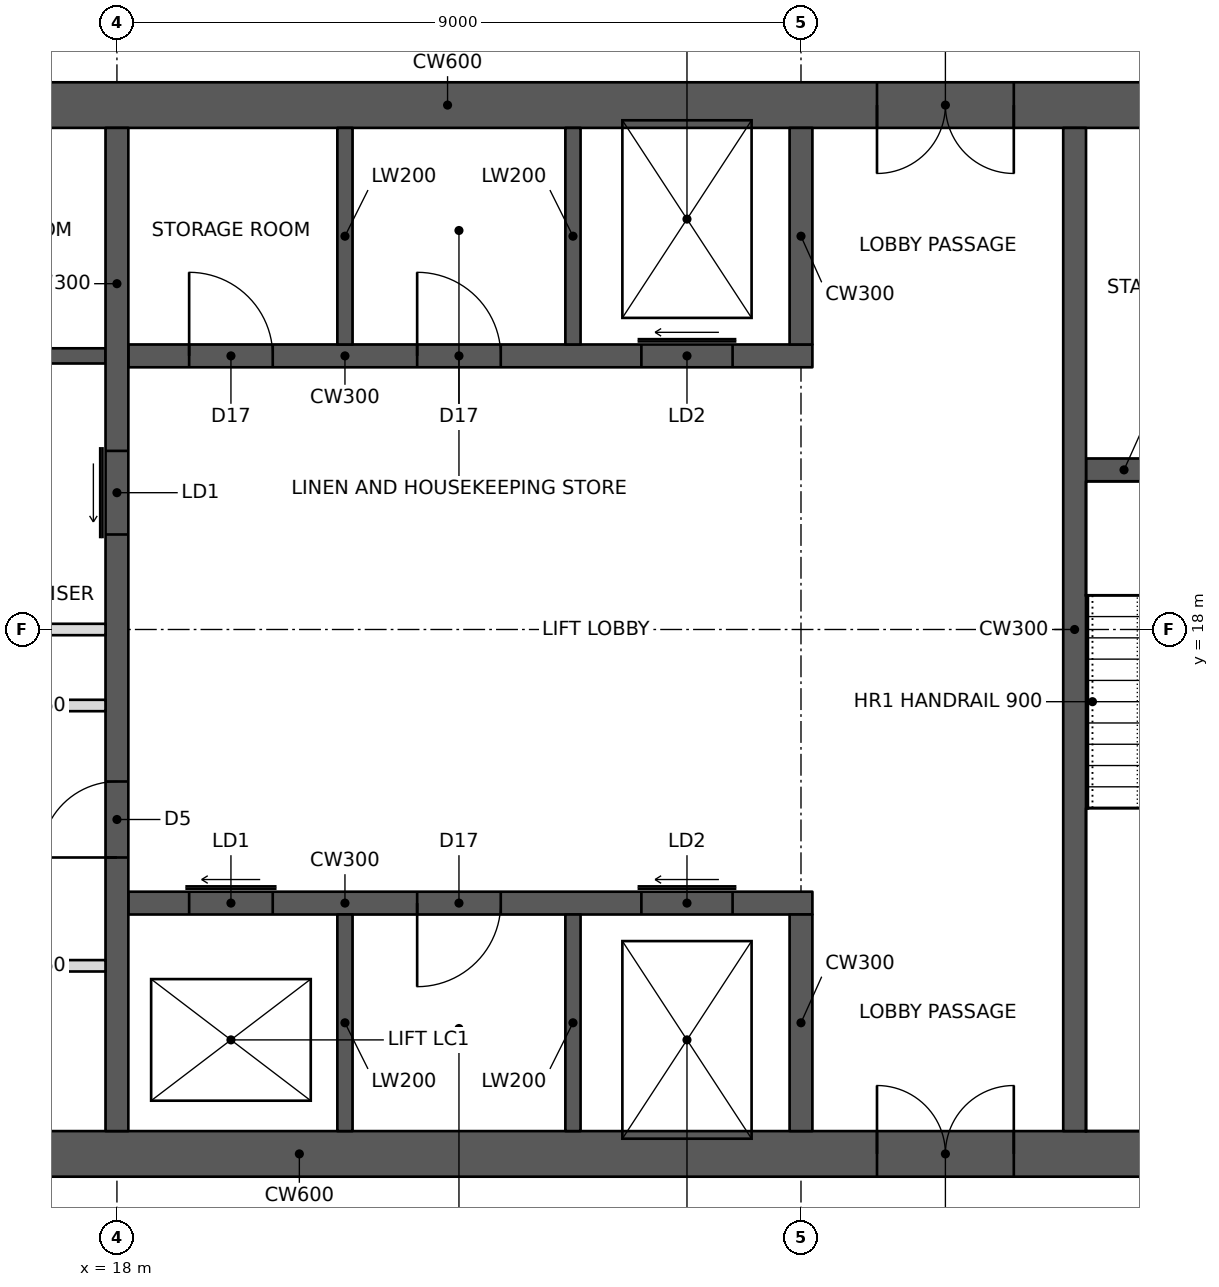
"""IFC4 building model, lengths in metres.
Left out: names, types, materials, properties, quantities, classifications, styles, units other than length and angle.
Written with IfcOpenShell. Run it as: python <this file> out.ifc"""

import sys

from ifc_helpers import new_model, si_unit, direction, frame, frame_2d, origin, place, context, subcontext, project, spatial, rectangle, extrude, element, fill, save


model = new_model("IFC4")
c1 = context("Model", 3, precision=1e-05, world=origin(), true_north=direction((0.0, 1.0)))
c2 = subcontext(c1, "Body", "Model", "MODEL_VIEW")
j1 = project(units=[si_unit("LENGTHUNIT", "METRE"), si_unit("PLANEANGLEUNIT", "RADIAN")], contexts=[c1])
p1 = place(None, origin())
s1 = spatial("IfcSite", under=j1, at=p1, CompositionType="ELEMENT")
p2 = place(p1, origin())
s2 = spatial("IfcBuilding", under=s1, at=p2, CompositionType="ELEMENT")
p3 = place(p2, frame((0.0, 0.0, 266.2)))
s3 = spatial("IfcBuildingStorey", under=s2, at=p3, CompositionType="ELEMENT", Elevation=266.2)
p4 = place(p3, frame((10.8, 11.1, 0.0), z_axis=(0.0, 0.0, 1.0), x_axis=(1.0, 0.0, 0.0)))
e1 = element("IfcWall", 1, at=p4, inside=s3, PredefinedType="SHEAR", context=c2, shape_type="SweptSolid", body=[
    extrude(rectangle(XDim=23.4, YDim=0.6, at=frame_2d((11.7, 0.0))), origin(), (0.0, 0.0, 1.0), 3.6),
])
p5 = place(p4, frame((1.0, 0.0, 0.0)))
e2 = element("IfcOpeningElement", 2, at=p5, cuts=e1, PredefinedType="OPENING", context=c2, shape_type="SweptSolid", body=[
    extrude(rectangle(XDim=1.0, YDim=2.1, at=frame_2d((0.5, 1.05))), frame((0.0, 0.31, 0.0), z_axis=(0.0, -1.0, 0.0), x_axis=(1.0, 0.0, 0.0)), (0.0, 0.0, 1.0), 0.62),
])
p6 = place(p4, frame((17.2, 0.0, 0.0)))
e3 = element("IfcOpeningElement", 3, at=p6, cuts=e1, PredefinedType="OPENING", context=c2, shape_type="SweptSolid", body=[
    extrude(rectangle(XDim=1.8, YDim=2.1, at=frame_2d((0.9, 1.05))), frame((0.0, 0.31, 0.0), z_axis=(0.0, -1.0, 0.0), x_axis=(1.0, 0.0, 0.0)), (0.0, 0.0, 1.0), 0.62),
])
p7 = place(p3, frame((10.8, 24.9, 0.0), z_axis=(0.0, 0.0, 1.0), x_axis=(1.0, 0.0, 0.0)))
e4 = element("IfcWall", 4, at=p7, inside=s3, PredefinedType="SHEAR", context=c2, shape_type="SweptSolid", body=[
    extrude(rectangle(XDim=23.4, YDim=0.6, at=frame_2d((11.7, 0.0))), origin(), (0.0, 0.0, 1.0), 3.6),
])
p8 = place(p7, frame((17.2, 0.0, 0.0)))
e5 = element("IfcOpeningElement", 5, at=p8, cuts=e4, PredefinedType="OPENING", context=c2, shape_type="SweptSolid", body=[
    extrude(rectangle(XDim=1.8, YDim=2.1, at=frame_2d((0.9, 1.05))), frame((0.0, 0.31, 0.0), z_axis=(0.0, -1.0, 0.0), x_axis=(1.0, 0.0, 0.0)), (0.0, 0.0, 1.0), 0.62),
])
p9 = place(p7, frame((21.1, 0.0, 0.0)))
e6 = element("IfcOpeningElement", 6, at=p9, cuts=e4, PredefinedType="OPENING", context=c2, shape_type="SweptSolid", body=[
    extrude(rectangle(XDim=1.0, YDim=2.1, at=frame_2d((0.5, 1.05))), frame((0.0, 0.31, 0.0), z_axis=(0.0, -1.0, 0.0), x_axis=(1.0, 0.0, 0.0)), (0.0, 0.0, 1.0), 0.62),
])
p10 = place(p7, frame((4.9, 0.0, 0.0)))
e7 = element("IfcOpeningElement", 7, at=p10, cuts=e4, PredefinedType="OPENING", context=c2, shape_type="SweptSolid", body=[
    extrude(rectangle(XDim=1.0, YDim=2.1, at=frame_2d((0.5, 1.05))), frame((0.0, 0.31, 0.0), z_axis=(0.0, -1.0, 0.0), x_axis=(1.0, 0.0, 0.0)), (0.0, 0.0, 1.0), 0.62),
])
p11 = place(p3, frame((18.0, 11.4, 0.0), z_axis=(0.0, 0.0, 1.0), x_axis=(0.0, 1.0, 0.0)))
e8 = element("IfcWall", 8, at=p11, inside=s3, PredefinedType="SHEAR", context=c2, shape_type="SweptSolid", body=[
    extrude(rectangle(XDim=13.2, YDim=0.3, at=frame_2d((6.6, 0.0))), origin(), (0.0, 0.0, 1.0), 3.6),
])
p12 = place(p11, frame((3.6, 0.0, 0.0)))
e9 = element("IfcOpeningElement", 9, at=p12, cuts=e8, PredefinedType="OPENING", context=c2, shape_type="SweptSolid", body=[
    extrude(rectangle(XDim=1.0, YDim=2.1, at=frame_2d((0.5, 1.05))), frame((0.0, 0.16, 0.0), z_axis=(0.0, -1.0, 0.0), x_axis=(1.0, 0.0, 0.0)), (0.0, 0.0, 1.0), 0.32),
])
p13 = place(p11, frame((7.85, 0.0, 0.0)))
e10 = element("IfcOpeningElement", 10, at=p13, cuts=e8, PredefinedType="OPENING", context=c2, shape_type="SweptSolid", body=[
    extrude(rectangle(XDim=1.1, YDim=2.1, at=frame_2d((0.55, 1.05))), frame((0.0, 0.16, 0.0), z_axis=(0.0, -1.0, 0.0), x_axis=(1.0, 0.0, 0.0)), (0.0, 0.0, 1.0), 0.32),
])
p14 = place(p3, frame((14.55, 18.0, 0.0), z_axis=(0.0, 0.0, 1.0), x_axis=(1.0, 0.0, 0.0)))
e11 = element("IfcWall", 11, at=p14, inside=s3, PredefinedType="PARTITIONING", context=c2, shape_type="SweptSolid", body=[
    extrude(rectangle(XDim=3.3, YDim=0.15, at=frame_2d((1.65, 0.0))), origin(), (0.0, 0.0, 1.0), 3.35),
])
p15 = place(p3, frame((18.15, 14.4, 0.0), z_axis=(0.0, 0.0, 1.0), x_axis=(1.0, 0.0, 0.0)))
e12 = element("IfcWall", 12, at=p15, inside=s3, PredefinedType="SHEAR", context=c2, shape_type="SweptSolid", body=[
    extrude(rectangle(XDim=9.0, YDim=0.3, at=frame_2d((4.5, 0.0))), origin(), (0.0, 0.0, 1.0), 3.6),
])
p16 = place(p15, frame((0.8, 0.0, 0.0)))
e13 = element("IfcOpeningElement", 13, at=p16, cuts=e12, PredefinedType="OPENING", context=c2, shape_type="SweptSolid", body=[
    extrude(rectangle(XDim=1.1, YDim=2.1, at=frame_2d((0.55, 1.05))), frame((0.0, 0.16, 0.0), z_axis=(0.0, -1.0, 0.0), x_axis=(1.0, 0.0, 0.0)), (0.0, 0.0, 1.0), 0.32),
])
p17 = place(p15, frame((6.75, 0.0, 0.0)))
e14 = element("IfcOpeningElement", 14, at=p17, cuts=e12, PredefinedType="OPENING", context=c2, shape_type="SweptSolid", body=[
    extrude(rectangle(XDim=1.2, YDim=2.1, at=frame_2d((0.6, 1.05))), frame((0.0, 0.16, 0.0), z_axis=(0.0, -1.0, 0.0), x_axis=(1.0, 0.0, 0.0)), (0.0, 0.0, 1.0), 0.32),
])
p18 = place(p15, frame((3.8, 0.0, 0.0)))
e15 = element("IfcOpeningElement", 15, at=p18, cuts=e12, PredefinedType="OPENING", context=c2, shape_type="SweptSolid", body=[
    extrude(rectangle(XDim=1.1, YDim=2.1, at=frame_2d((0.55, 1.05))), frame((0.0, 0.16, 0.0), z_axis=(0.0, -1.0, 0.0), x_axis=(1.0, 0.0, 0.0)), (0.0, 0.0, 1.0), 0.32),
])
p19 = place(p3, frame((27.0, 11.4, 0.0), z_axis=(0.0, 0.0, 1.0), x_axis=(0.0, 1.0, 0.0)))
e16 = element("IfcWall", 16, at=p19, inside=s3, PredefinedType="SHEAR", context=c2, shape_type="SweptSolid", body=[
    extrude(rectangle(XDim=2.85, YDim=0.3, at=frame_2d((1.425, 0.0))), origin(), (0.0, 0.0, 1.0), 3.6),
])
for number, where, z_axis, x_axis in (
    (17, (21.0, 11.4, 0.0), (0.0, 0.0, 1.0), (0.0, 1.0, 0.0)),
    (18, (24.0, 11.4, 0.0), (0.0, 0.0, 1.0), (0.0, 1.0, 0.0)),
):
    element("IfcWall", number, at=place(p3, frame(where, z_axis=z_axis, x_axis=x_axis)), inside=s3, PredefinedType="SHEAR", context=c2, shape_type="SweptSolid", body=[
        extrude(rectangle(XDim=2.85, YDim=0.2, at=frame_2d((1.425, 0.0))), origin(), (0.0, 0.0, 1.0), 3.6),
    ])
p20 = place(p3, frame((18.15, 21.6, 0.0), z_axis=(0.0, 0.0, 1.0), x_axis=(1.0, 0.0, 0.0)))
e19 = element("IfcWall", 19, at=p20, inside=s3, PredefinedType="SHEAR", context=c2, shape_type="SweptSolid", body=[
    extrude(rectangle(XDim=9.0, YDim=0.3, at=frame_2d((4.5, 0.0))), origin(), (0.0, 0.0, 1.0), 3.6),
])
p21 = place(p20, frame((6.75, 0.0, 0.0)))
e20 = element("IfcOpeningElement", 20, at=p21, cuts=e19, PredefinedType="OPENING", context=c2, shape_type="SweptSolid", body=[
    extrude(rectangle(XDim=1.2, YDim=2.1, at=frame_2d((0.6, 1.05))), frame((0.0, 0.16, 0.0), z_axis=(0.0, -1.0, 0.0), x_axis=(1.0, 0.0, 0.0)), (0.0, 0.0, 1.0), 0.32),
])
p22 = place(p20, frame((0.8, 0.0, 0.0)))
e21 = element("IfcOpeningElement", 21, at=p22, cuts=e19, PredefinedType="OPENING", context=c2, shape_type="SweptSolid", body=[
    extrude(rectangle(XDim=1.1, YDim=2.1, at=frame_2d((0.55, 1.05))), frame((0.0, 0.16, 0.0), z_axis=(0.0, -1.0, 0.0), x_axis=(1.0, 0.0, 0.0)), (0.0, 0.0, 1.0), 0.32),
])
p23 = place(p20, frame((3.8, 0.0, 0.0)))
e22 = element("IfcOpeningElement", 22, at=p23, cuts=e19, PredefinedType="OPENING", context=c2, shape_type="SweptSolid", body=[
    extrude(rectangle(XDim=1.1, YDim=2.1, at=frame_2d((0.55, 1.05))), frame((0.0, 0.16, 0.0), z_axis=(0.0, -1.0, 0.0), x_axis=(1.0, 0.0, 0.0)), (0.0, 0.0, 1.0), 0.32),
])
p24 = place(p3, frame((27.0, 21.75, 0.0), z_axis=(0.0, 0.0, 1.0), x_axis=(0.0, 1.0, 0.0)))
e23 = element("IfcWall", 23, at=p24, inside=s3, PredefinedType="SHEAR", context=c2, shape_type="SweptSolid", body=[
    extrude(rectangle(XDim=2.85, YDim=0.3, at=frame_2d((1.425, 0.0))), origin(), (0.0, 0.0, 1.0), 3.6),
])
for number, where, z_axis, x_axis in (
    (24, (21.0, 21.75, 0.0), (0.0, 0.0, 1.0), (0.0, 1.0, 0.0)),
    (25, (24.0, 21.75, 0.0), (0.0, 0.0, 1.0), (0.0, 1.0, 0.0)),
):
    element("IfcWall", number, at=place(p3, frame(where, z_axis=z_axis, x_axis=x_axis)), inside=s3, PredefinedType="SHEAR", context=c2, shape_type="SweptSolid", body=[
        extrude(rectangle(XDim=2.85, YDim=0.2, at=frame_2d((1.425, 0.0))), origin(), (0.0, 0.0, 1.0), 3.6),
    ])
p25 = place(p3, frame((30.6, 11.4, 0.0), z_axis=(0.0, 0.0, 1.0), x_axis=(0.0, 1.0, 0.0)))
e26 = element("IfcWall", 26, at=p25, inside=s3, PredefinedType="SHEAR", context=c2, shape_type="SweptSolid", body=[
    extrude(rectangle(XDim=13.2, YDim=0.3, at=frame_2d((6.6, 0.0))), origin(), (0.0, 0.0, 1.0), 3.6),
])
p26 = place(p3, frame((30.75, 20.1, 0.0), z_axis=(0.0, 0.0, 1.0), x_axis=(1.0, 0.0, 0.0)))
e27 = element("IfcWall", 27, at=p26, inside=s3, PredefinedType="SHEAR", context=c2, shape_type="SweptSolid", body=[
    extrude(rectangle(XDim=2.85, YDim=0.3, at=frame_2d((1.425, 0.0))), origin(), (0.0, 0.0, 1.0), 3.6),
])
p27 = place(p26, frame((1.15, 0.0, 0.0)))
e28 = element("IfcOpeningElement", 28, at=p27, cuts=e27, PredefinedType="OPENING", context=c2, shape_type="SweptSolid", body=[
    extrude(rectangle(XDim=1.0, YDim=2.1, at=frame_2d((0.5, 1.05))), frame((0.0, 0.16, 0.0), z_axis=(0.0, -1.0, 0.0), x_axis=(1.0, 0.0, 0.0)), (0.0, 0.0, 1.0), 0.32),
])
p28 = place(p3, frame((14.55, 21.6, 0.0), z_axis=(0.0, 0.0, 1.0), x_axis=(1.0, 0.0, 0.0)))
e29 = element("IfcWall", 29, at=p28, inside=s3, PredefinedType="SHEAR", context=c2, shape_type="SweptSolid", body=[
    extrude(rectangle(XDim=3.3, YDim=0.2, at=frame_2d((1.65, 0.0))), origin(), (0.0, 0.0, 1.0), 3.6),
])
p29 = place(p3, frame((14.55, 17.0, 0.0), z_axis=(0.0, 0.0, 1.0), x_axis=(1.0, 0.0, 0.0)))
e30 = element("IfcWall", 30, at=p29, inside=s3, PredefinedType="PARTITIONING", context=c2, shape_type="SweptSolid", body=[
    extrude(rectangle(XDim=3.3, YDim=0.15, at=frame_2d((1.65, 0.0))), origin(), (0.0, 0.0, 1.0), 3.35),
])
p30 = place(p29, frame((0.3, 0.0, 0.0)))
e31 = element("IfcOpeningElement", 31, at=p30, cuts=e30, PredefinedType="OPENING", context=c2, shape_type="SweptSolid", body=[
    extrude(rectangle(XDim=1.0, YDim=2.1, at=frame_2d((0.5, 1.05))), frame((0.0, 0.085, 0.0), z_axis=(0.0, -1.0, 0.0), x_axis=(1.0, 0.0, 0.0)), (0.0, 0.0, 1.0), 0.17),
])
p31 = place(p3, frame((14.55, 13.575, 0.0), z_axis=(0.0, 0.0, 1.0), x_axis=(1.0, 0.0, 0.0)))
e32 = element("IfcWall", 32, at=p31, inside=s3, PredefinedType="PARTITIONING", context=c2, shape_type="SweptSolid", body=[
    extrude(rectangle(XDim=3.3, YDim=0.15, at=frame_2d((1.65, 0.0))), origin(), (0.0, 0.0, 1.0), 3.35),
])
p32 = place(p31, frame((0.3, 0.0, 0.0)))
e33 = element("IfcOpeningElement", 33, at=p32, cuts=e32, PredefinedType="OPENING", context=c2, shape_type="SweptSolid", body=[
    extrude(rectangle(XDim=1.0, YDim=2.1, at=frame_2d((0.5, 1.05))), frame((0.0, 0.085, 0.0), z_axis=(0.0, -1.0, 0.0), x_axis=(1.0, 0.0, 0.0)), (0.0, 0.0, 1.0), 0.17),
])
p33 = place(p6, origin())
e34 = element("IfcDoor", 34, at=p33, inside=s3, OperationType="DOUBLE_DOOR_SINGLE_SWING", PredefinedType="DOOR", context=c2, shape_type="SweptSolid", body=[
    extrude(rectangle(XDim=1.8, YDim=2.1, at=frame_2d((0.9, 1.05))), frame((0.0, 0.025, 0.0), z_axis=(0.0, -1.0, 0.0), x_axis=(1.0, 0.0, 0.0)), (0.0, 0.0, 1.0), 0.05),
])
fill(e3, e34)
p34 = place(p8, frame((1.8, 0.0, 0.0), z_axis=(0.0, 0.0, 1.0), x_axis=(-1.0, 0.0, 0.0)))
e35 = element("IfcDoor", 35, at=p34, inside=s3, OperationType="DOUBLE_DOOR_SINGLE_SWING", PredefinedType="DOOR", context=c2, shape_type="SweptSolid", body=[
    extrude(rectangle(XDim=1.8, YDim=2.1, at=frame_2d((0.9, 1.05))), frame((0.0, 0.025, 0.0), z_axis=(0.0, -1.0, 0.0), x_axis=(1.0, 0.0, 0.0)), (0.0, 0.0, 1.0), 0.05),
])
fill(e5, e35)
p35 = place(p12, origin())
e36 = element("IfcDoor", 36, at=p35, inside=s3, OperationType="SINGLE_SWING_LEFT", PredefinedType="DOOR", context=c2, shape_type="SweptSolid", body=[
    extrude(rectangle(XDim=1.0, YDim=2.1, at=frame_2d((0.5, 1.05))), frame((0.0, 0.025, 0.0), z_axis=(0.0, -1.0, 0.0), x_axis=(1.0, 0.0, 0.0)), (0.0, 0.0, 1.0), 0.05),
])
fill(e9, e36)
p36 = place(p16, origin())
e37 = element("IfcDoor", 37, at=p36, inside=s3, OperationType="SLIDING_TO_LEFT", PredefinedType="DOOR", context=c2, shape_type="SweptSolid", body=[
    extrude(rectangle(XDim=1.1, YDim=2.1, at=frame_2d((0.55, 1.05))), frame((0.0, 0.025, 0.0), z_axis=(0.0, -1.0, 0.0), x_axis=(1.0, 0.0, 0.0)), (0.0, 0.0, 1.0), 0.05),
])
fill(e13, e37)
p37 = place(p13, origin())
e38 = element("IfcDoor", 38, at=p37, inside=s3, OperationType="SLIDING_TO_LEFT", PredefinedType="DOOR", context=c2, shape_type="SweptSolid", body=[
    extrude(rectangle(XDim=1.1, YDim=2.1, at=frame_2d((0.55, 1.05))), frame((0.0, 0.025, 0.0), z_axis=(0.0, -1.0, 0.0), x_axis=(1.0, 0.0, 0.0)), (0.0, 0.0, 1.0), 0.05),
])
fill(e10, e38)
p38 = place(p17, origin())
e39 = element("IfcDoor", 39, at=p38, inside=s3, OperationType="SLIDING_TO_LEFT", PredefinedType="DOOR", context=c2, shape_type="SweptSolid", body=[
    extrude(rectangle(XDim=1.2, YDim=2.1, at=frame_2d((0.6, 1.05))), frame((0.0, 0.025, 0.0), z_axis=(0.0, -1.0, 0.0), x_axis=(1.0, 0.0, 0.0)), (0.0, 0.0, 1.0), 0.05),
])
fill(e14, e39)
p39 = place(p21, origin())
e40 = element("IfcDoor", 40, at=p39, inside=s3, OperationType="SLIDING_TO_LEFT", PredefinedType="DOOR", context=c2, shape_type="SweptSolid", body=[
    extrude(rectangle(XDim=1.2, YDim=2.1, at=frame_2d((0.6, 1.05))), frame((0.0, 0.025, 0.0), z_axis=(0.0, -1.0, 0.0), x_axis=(1.0, 0.0, 0.0)), (0.0, 0.0, 1.0), 0.05),
])
fill(e20, e40)
p40 = place(p22, origin())
e41 = element("IfcDoor", 41, at=p40, inside=s3, OperationType="SINGLE_SWING_LEFT", PredefinedType="DOOR", context=c2, shape_type="SweptSolid", body=[
    extrude(rectangle(XDim=1.1, YDim=2.1, at=frame_2d((0.55, 1.05))), frame((0.0, 0.025, 0.0), z_axis=(0.0, -1.0, 0.0), x_axis=(1.0, 0.0, 0.0)), (0.0, 0.0, 1.0), 0.05),
])
fill(e21, e41)
p41 = place(p23, origin())
e42 = element("IfcDoor", 42, at=p41, inside=s3, OperationType="SINGLE_SWING_LEFT", PredefinedType="DOOR", context=c2, shape_type="SweptSolid", body=[
    extrude(rectangle(XDim=1.1, YDim=2.1, at=frame_2d((0.55, 1.05))), frame((0.0, 0.025, 0.0), z_axis=(0.0, -1.0, 0.0), x_axis=(1.0, 0.0, 0.0)), (0.0, 0.0, 1.0), 0.05),
])
fill(e22, e42)
p42 = place(p18, frame((1.1, 0.0, 0.0), z_axis=(0.0, 0.0, 1.0), x_axis=(-1.0, 0.0, 0.0)))
e43 = element("IfcDoor", 43, at=p42, inside=s3, OperationType="SINGLE_SWING_RIGHT", PredefinedType="DOOR", context=c2, shape_type="SweptSolid", body=[
    extrude(rectangle(XDim=1.1, YDim=2.1, at=frame_2d((0.55, 1.05))), frame((0.0, 0.025, 0.0), z_axis=(0.0, -1.0, 0.0), x_axis=(1.0, 0.0, 0.0)), (0.0, 0.0, 1.0), 0.05),
])
fill(e15, e43)
save(model, sys.argv[1])
